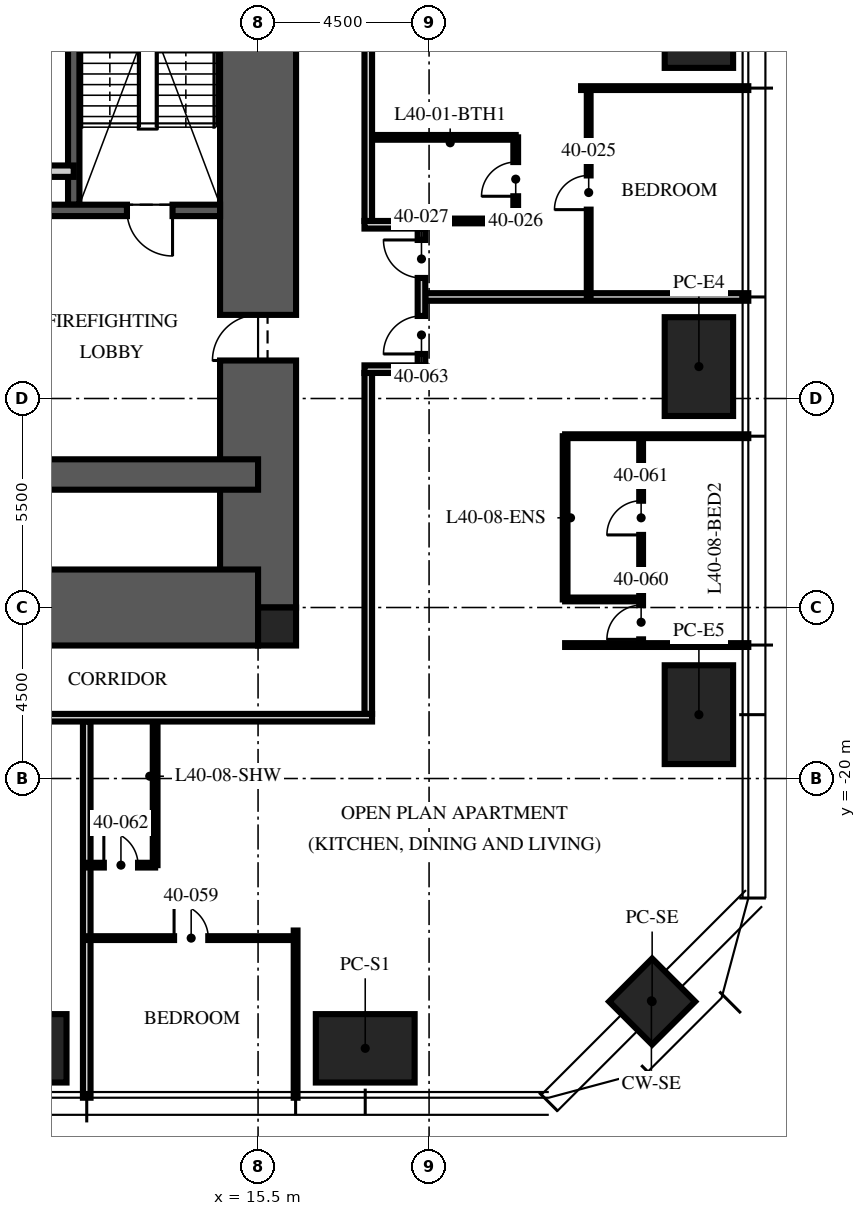
"""IFC4 building model, lengths in metres.
Left out: names, types, materials, properties, quantities, classifications, styles, units other than length and angle.
Written with IfcOpenShell. Run it as: python <this file> out.ifc"""

import sys

from ifc_helpers import new_model, si_unit, direction, frame, frame_2d, origin, origin_2d, place, context, subcontext, project, spatial, rectangle, extrude, element, fill, save


model = new_model("IFC4")
c1 = context("Model", 3, precision=1e-05, world=origin(), true_north=direction((0.0, 1.0)))
c2 = subcontext(c1, "Body", "Model", "MODEL_VIEW")
j1 = project(units=[si_unit("LENGTHUNIT", "METRE"), si_unit("PLANEANGLEUNIT", "RADIAN")], contexts=[c1])
p1 = place(None, origin())
s1 = spatial("IfcSite", under=j1, at=p1, CompositionType="ELEMENT")
p2 = place(p1, origin())
s2 = spatial("IfcBuilding", under=s1, at=p2, CompositionType="ELEMENT")
p3 = place(p2, frame((0.0, 0.0, 159.75)))
s3 = spatial("IfcBuildingStorey", under=s2, at=p3, CompositionType="ELEMENT", Elevation=159.75)
p4 = place(p3, frame((15.5, -15.5, -0.25), z_axis=(0.0, 0.0, 1.0), x_axis=(0.0, 1.0, 0.0)))
e1 = element("IfcWall", 1, at=p4, inside=s3, PredefinedType="SHEAR", context=c2, shape_type="SweptSolid", body=[
    extrude(rectangle(XDim=31.0, YDim=2.0, at=frame_2d((15.5, 0.0))), origin(), (0.0, 0.0, 1.0), 3.75),
])
p5 = place(p4, frame((6.5, 0.0, 0.25)))
e2 = element("IfcOpeningElement", 2, at=p5, cuts=e1, PredefinedType="OPENING", context=c2, shape_type="SweptSolid", body=[
    extrude(rectangle(XDim=1.2, YDim=2.1, at=frame_2d((0.6, 1.05))), frame((0.0, 1.01, 0.0), z_axis=(0.0, -1.0, 0.0), x_axis=(1.0, 0.0, 0.0)), (0.0, 0.0, 1.0), 2.02),
])
p6 = place(p4, frame((23.0, 0.0, 0.25)))
e3 = element("IfcOpeningElement", 3, at=p6, cuts=e1, PredefinedType="OPENING", context=c2, shape_type="SweptSolid", body=[
    extrude(rectangle(XDim=1.8, YDim=2.1, at=frame_2d((0.9, 1.05))), frame((0.0, 1.01, 0.0), z_axis=(0.0, -1.0, 0.0), x_axis=(1.0, 0.0, 0.0)), (0.0, 0.0, 1.0), 2.02),
])
p7 = place(p3, frame((-15.5, -15.5, -0.25), z_axis=(0.0, 0.0, 1.0), x_axis=(1.0, 0.0, 0.0)))
e4 = element("IfcWall", 4, at=p7, inside=s3, PredefinedType="SHEAR", context=c2, shape_type="SweptSolid", body=[
    extrude(rectangle(XDim=31.0, YDim=2.0, at=frame_2d((15.5, 0.0))), origin(), (0.0, 0.0, 1.0), 3.75),
])
p8 = place(p7, frame((10.4, 0.0, 0.25)))
e5 = element("IfcOpeningElement", 5, at=p8, cuts=e4, PredefinedType="OPENING", context=c2, shape_type="SweptSolid", body=[
    extrude(rectangle(XDim=1.1, YDim=2.1, at=frame_2d((0.55, 1.05))), frame((0.0, 1.01, 0.0), z_axis=(0.0, -1.0, 0.0), x_axis=(1.0, 0.0, 0.0)), (0.0, 0.0, 1.0), 2.02),
])
p9 = place(p7, frame((13.5, 0.0, 0.25)))
e6 = element("IfcOpeningElement", 6, at=p9, cuts=e4, PredefinedType="OPENING", context=c2, shape_type="SweptSolid", body=[
    extrude(rectangle(XDim=1.1, YDim=2.1, at=frame_2d((0.55, 1.05))), frame((0.0, 1.01, 0.0), z_axis=(0.0, -1.0, 0.0), x_axis=(1.0, 0.0, 0.0)), (0.0, 0.0, 1.0), 2.02),
])
p10 = place(p7, frame((16.6, 0.0, 0.25)))
e7 = element("IfcOpeningElement", 7, at=p10, cuts=e4, PredefinedType="OPENING", context=c2, shape_type="SweptSolid", body=[
    extrude(rectangle(XDim=1.1, YDim=2.1, at=frame_2d((0.55, 1.05))), frame((0.0, 1.01, 0.0), z_axis=(0.0, -1.0, 0.0), x_axis=(1.0, 0.0, 0.0)), (0.0, 0.0, 1.0), 2.02),
])
p11 = place(p3, frame((-15.5, -12.0, -0.25), z_axis=(0.0, 0.0, 1.0), x_axis=(1.0, 0.0, 0.0)))
e8 = element("IfcWall", 8, at=p11, inside=s3, PredefinedType="SHEAR", context=c2, shape_type="SweptSolid", body=[
    extrude(rectangle(XDim=31.0, YDim=0.8, at=frame_2d((15.5, 0.0))), origin(), (0.0, 0.0, 1.0), 3.75),
])
p12 = place(p3, frame((16.0, -16.0, -0.25), z_axis=(0.0, 0.0, 1.0), x_axis=(1.0, 0.0, 0.0)))
e9 = element("IfcColumn", 9, at=p12, inside=s3, PredefinedType="COLUMN", context=c2, shape_type="SweptSolid", body=[
    extrude(rectangle(XDim=1.0, YDim=1.0, at=origin_2d()), origin(), (0.0, 0.0, 1.0), 3.75),
])
for number, where, z_axis, x_axis in (
    (10, (27.1, 0.0, 0.0), (0.0, 0.0, 1.0), (0.0, 1.0, 0.0)),
    (11, (27.1, -9.16, 0.0), (0.0, 0.0, 1.0), (0.0, 1.0, 0.0)),
    (12, (27.1, -18.32, 0.0), (0.0, 0.0, 1.0), (0.0, 1.0, 0.0)),
    (13, (18.32, -27.1, 0.0), (0.0, 0.0, 1.0), (1.0, 0.0, 0.0)),
    (14, (9.16, -27.1, 0.0), (0.0, 0.0, 1.0), (1.0, 0.0, 0.0)),
):
    element("IfcColumn", number, at=place(p3, frame(where, z_axis=z_axis, x_axis=x_axis)), inside=s3, PredefinedType="COLUMN", context=c2, shape_type="SweptSolid", body=[
        extrude(rectangle(XDim=2.6, YDim=1.8, at=origin_2d()), origin(), (0.0, 0.0, 1.0), 3.75),
    ])
p13 = place(p3, frame((25.87, -25.87, 0.0), z_axis=(0.0, 0.0, 1.0), x_axis=(0.707106781187, 0.707106781187, 0.0)))
e15 = element("IfcColumn", 15, at=p13, inside=s3, PredefinedType="COLUMN", context=c2, shape_type="SweptSolid", body=[
    extrude(rectangle(XDim=1.6, YDim=1.6, at=origin_2d()), origin(), (0.0, 0.0, 1.0), 3.75),
])
p14 = place(p3, frame((10.65, -4.9, 0.0), z_axis=(0.0, 0.0, 1.0), x_axis=(0.0, 1.0, 0.0)))
e16 = element("IfcWall", 16, at=p14, inside=s3, PredefinedType="SOLIDWALL", context=c2, shape_type="SweptSolid", body=[
    extrude(rectangle(XDim=10.1, YDim=0.3, at=frame_2d((5.05, 0.0))), origin(), (0.0, 0.0, 1.0), 3.5),
])
p15 = place(p3, frame((14.5, -5.05, 0.0), z_axis=(0.0, 0.0, 1.0), x_axis=(-1.0, 0.0, 0.0)))
e17 = element("IfcWall", 17, at=p15, inside=s3, PredefinedType="SOLIDWALL", context=c2, shape_type="SweptSolid", body=[
    extrude(rectangle(XDim=5.7, YDim=0.3, at=frame_2d((2.85, 0.0))), origin(), (0.0, 0.0, 1.0), 3.5),
])
p16 = place(p15, frame((1.25, 0.0, 0.0)))
e18 = element("IfcOpeningElement", 18, at=p16, cuts=e17, PredefinedType="OPENING", context=c2, shape_type="SweptSolid", body=[
    extrude(rectangle(XDim=1.2, YDim=2.1, at=frame_2d((0.6, 1.05))), frame((0.0, 0.16, 0.0), z_axis=(0.0, -1.0, 0.0), x_axis=(1.0, 0.0, 0.0)), (0.0, 0.0, 1.0), 0.32),
])
p17 = place(p3, frame((10.65, -4.018, 0.0), z_axis=(0.0, 0.0, 1.0), x_axis=(-1.0, 0.0, 0.0)))
e19 = element("IfcWall", 19, at=p17, inside=s3, PredefinedType="PARTITIONING", context=c2, shape_type="SweptSolid", body=[
    extrude(rectangle(XDim=6.45, YDim=0.3, at=frame_2d((3.225, 0.0))), origin(), (0.0, 0.0, 1.0), 3.5),
])
p18 = place(p3, frame((19.9, -7.328, 0.0), z_axis=(0.0, 0.0, 1.0), x_axis=(1.0, 0.0, 0.0)))
e20 = element("IfcWall", 20, at=p18, inside=s3, PredefinedType="PARTITIONING", context=c2, shape_type="SweptSolid", body=[
    extrude(rectangle(XDim=8.5, YDim=0.2, at=frame_2d((4.25, 0.0))), origin(), (0.0, 0.0, 1.0), 2.81),
])
p19 = place(p3, frame((24.0, -1.832, 0.0), z_axis=(0.0, 0.0, 1.0), x_axis=(1.0, 0.0, 0.0)))
e21 = element("IfcWall", 21, at=p19, inside=s3, PredefinedType="PARTITIONING", context=c2, shape_type="SweptSolid", body=[
    extrude(rectangle(XDim=4.4, YDim=0.1, at=frame_2d((2.2, 0.0))), origin(), (0.0, 0.0, 1.0), 2.81),
])
p20 = place(p3, frame((10.992, -18.5, 0.0), z_axis=(0.0, 0.0, 1.0), x_axis=(0.0, -1.0, 0.0)))
e22 = element("IfcWall", 22, at=p20, inside=s3, PredefinedType="PARTITIONING", context=c2, shape_type="SweptSolid", body=[
    extrude(rectangle(XDim=9.9, YDim=0.2, at=frame_2d((4.95, 0.0))), origin(), (0.0, 0.0, 1.0), 2.81),
])
p21 = place(p3, frame((16.488, -24.0, 0.0), z_axis=(0.0, 0.0, 1.0), x_axis=(0.0, -1.0, 0.0)))
e23 = element("IfcWall", 23, at=p21, inside=s3, PredefinedType="PARTITIONING", context=c2, shape_type="SweptSolid", body=[
    extrude(rectangle(XDim=4.4, YDim=0.1, at=frame_2d((2.2, 0.0))), origin(), (0.0, 0.0, 1.0), 2.81),
])
for number, where, z_axis, x_axis in (
    (24, (23.58, -16.488, 0.0), (0.0, 0.0, 1.0), (1.0, 0.0, 0.0)),
    (25, (23.58, -10.992, 0.0), (0.0, 0.0, 1.0), (1.0, 0.0, 0.0)),
):
    element("IfcWall", number, at=place(p3, frame(where, z_axis=z_axis, x_axis=x_axis)), inside=s3, PredefinedType="PARTITIONING", context=c2, shape_type="SweptSolid", body=[
        extrude(rectangle(XDim=4.82, YDim=0.1, at=frame_2d((2.41, 0.0))), origin(), (0.0, 0.0, 1.0), 2.81),
    ])
p22 = place(p3, frame((24.2, -7.328, 0.0), z_axis=(0.0, 0.0, 1.0), x_axis=(0.0, 1.0, 0.0)))
e26 = element("IfcWall", 26, at=p22, inside=s3, PredefinedType="PARTITIONING", context=c2, shape_type="SweptSolid", body=[
    extrude(rectangle(XDim=5.496, YDim=0.1, at=frame_2d((2.748, 0.0))), origin(), (0.0, 0.0, 1.0), 2.81),
])
p23 = place(p22, frame((2.298, 0.0, 0.0)))
e27 = element("IfcOpeningElement", 27, at=p23, cuts=e26, PredefinedType="OPENING", context=c2, shape_type="SweptSolid", body=[
    extrude(rectangle(XDim=0.9, YDim=2.1, at=frame_2d((0.45, 1.05))), frame((0.0, 0.06, 0.0), z_axis=(0.0, -1.0, 0.0), x_axis=(1.0, 0.0, 0.0)), (0.0, 0.0, 1.0), 0.12),
])
p24 = place(p3, frame((22.28, -5.328, 0.0), z_axis=(0.0, 0.0, 1.0), x_axis=(0.0, 1.0, 0.0)))
e28 = element("IfcWall", 28, at=p24, inside=s3, PredefinedType="PARTITIONING", context=c2, shape_type="SweptSolid", body=[
    extrude(rectangle(XDim=2.2, YDim=0.125, at=frame_2d((1.1, 0.0))), origin(), (0.0, 0.0, 1.0), 2.81),
])
p25 = place(p24, frame((0.65, 0.0, 0.0)))
e29 = element("IfcOpeningElement", 29, at=p25, cuts=e28, PredefinedType="OPENING", context=c2, shape_type="SweptSolid", body=[
    extrude(rectangle(XDim=0.9, YDim=2.1, at=frame_2d((0.45, 1.05))), frame((0.0, 0.073, 0.0), z_axis=(0.0, -1.0, 0.0), x_axis=(1.0, 0.0, 0.0)), (0.0, 0.0, 1.0), 0.145),
])
p26 = place(p3, frame((19.97, -5.328, 0.0), z_axis=(0.0, 0.0, 1.0), x_axis=(1.0, 0.0, 0.0)))
e30 = element("IfcWall", 30, at=p26, inside=s3, PredefinedType="PARTITIONING", context=c2, shape_type="SweptSolid", body=[
    extrude(rectangle(XDim=2.31, YDim=0.125, at=frame_2d((1.155, 0.0))), origin(), (0.0, 0.0, 1.0), 3.5),
])
p27 = place(p3, frame((18.5, -3.128, 0.0), z_axis=(0.0, 0.0, 1.0), x_axis=(1.0, 0.0, 0.0)))
e31 = element("IfcWall", 31, at=p27, inside=s3, PredefinedType="PARTITIONING", context=c2, shape_type="SweptSolid", body=[
    extrude(rectangle(XDim=3.78, YDim=0.125, at=frame_2d((1.89, 0.0))), origin(), (0.0, 0.0, 1.0), 3.5),
])
p28 = place(p3, frame((10.992, -24.2, 0.0), z_axis=(0.0, 0.0, 1.0), x_axis=(1.0, 0.0, 0.0)))
e32 = element("IfcWall", 32, at=p28, inside=s3, PredefinedType="PARTITIONING", context=c2, shape_type="SweptSolid", body=[
    extrude(rectangle(XDim=5.496, YDim=0.1, at=frame_2d((2.748, 0.0))), origin(), (0.0, 0.0, 1.0), 2.81),
])
p29 = place(p28, frame((2.298, 0.0, 0.0)))
e33 = element("IfcOpeningElement", 33, at=p29, cuts=e32, PredefinedType="OPENING", context=c2, shape_type="SweptSolid", body=[
    extrude(rectangle(XDim=0.9, YDim=2.1, at=frame_2d((0.45, 1.05))), frame((0.0, 0.06, 0.0), z_axis=(0.0, -1.0, 0.0), x_axis=(1.0, 0.0, 0.0)), (0.0, 0.0, 1.0), 0.12),
])
p30 = place(p3, frame((25.58, -16.488, 0.0), z_axis=(0.0, 0.0, 1.0), x_axis=(0.0, 1.0, 0.0)))
e34 = element("IfcWall", 34, at=p30, inside=s3, PredefinedType="PARTITIONING", context=c2, shape_type="SweptSolid", body=[
    extrude(rectangle(XDim=5.496, YDim=0.1, at=frame_2d((2.748, 0.0))), origin(), (0.0, 0.0, 1.0), 2.81),
])
p31 = place(p30, frame((0.15, 0.0, 0.0)))
e35 = element("IfcOpeningElement", 35, at=p31, cuts=e34, PredefinedType="OPENING", context=c2, shape_type="SweptSolid", body=[
    extrude(rectangle(XDim=0.9, YDim=2.1, at=frame_2d((0.45, 1.05))), frame((0.0, 0.06, 0.0), z_axis=(0.0, -1.0, 0.0), x_axis=(1.0, 0.0, 0.0)), (0.0, 0.0, 1.0), 0.12),
])
p32 = place(p30, frame((2.898, 0.0, 0.0)))
e36 = element("IfcOpeningElement", 36, at=p32, cuts=e34, PredefinedType="OPENING", context=c2, shape_type="SweptSolid", body=[
    extrude(rectangle(XDim=0.9, YDim=2.1, at=frame_2d((0.45, 1.05))), frame((0.0, 0.06, 0.0), z_axis=(0.0, -1.0, 0.0), x_axis=(1.0, 0.0, 0.0)), (0.0, 0.0, 1.0), 0.12),
])
p33 = place(p3, frame((23.58, -15.288, 0.0), z_axis=(0.0, 0.0, 1.0), x_axis=(1.0, 0.0, 0.0)))
e37 = element("IfcWall", 37, at=p33, inside=s3, PredefinedType="PARTITIONING", context=c2, shape_type="SweptSolid", body=[
    extrude(rectangle(XDim=2.0, YDim=0.1, at=frame_2d((1.0, 0.0))), origin(), (0.0, 0.0, 1.0), 3.5),
])
p34 = place(p3, frame((23.58, -15.288, 0.0), z_axis=(0.0, 0.0, 1.0), x_axis=(0.0, 1.0, 0.0)))
e38 = element("IfcWall", 38, at=p34, inside=s3, PredefinedType="PARTITIONING", context=c2, shape_type="SweptSolid", body=[
    extrude(rectangle(XDim=4.296, YDim=0.125, at=frame_2d((2.148, 0.0))), origin(), (0.0, 0.0, 1.0), 2.81),
])
p35 = place(p3, frame((10.992, -22.28, 0.0), z_axis=(0.0, 0.0, 1.0), x_axis=(1.0, 0.0, 0.0)))
e39 = element("IfcWall", 39, at=p35, inside=s3, PredefinedType="PARTITIONING", context=c2, shape_type="SweptSolid", body=[
    extrude(rectangle(XDim=1.8, YDim=0.125, at=frame_2d((0.9, 0.0))), origin(), (0.0, 0.0, 1.0), 3.5),
])
p36 = place(p35, frame((0.45, 0.0, 0.0)))
e40 = element("IfcOpeningElement", 40, at=p36, cuts=e39, PredefinedType="OPENING", context=c2, shape_type="SweptSolid", body=[
    extrude(rectangle(XDim=0.9, YDim=2.1, at=frame_2d((0.45, 1.05))), frame((0.0, 0.073, 0.0), z_axis=(0.0, -1.0, 0.0), x_axis=(1.0, 0.0, 0.0)), (0.0, 0.0, 1.0), 0.145),
])
p37 = place(p3, frame((12.792, -18.5, 0.0), z_axis=(0.0, 0.0, 1.0), x_axis=(0.0, -1.0, 0.0)))
e41 = element("IfcWall", 41, at=p37, inside=s3, PredefinedType="PARTITIONING", context=c2, shape_type="SweptSolid", body=[
    extrude(rectangle(XDim=3.78, YDim=0.125, at=frame_2d((1.89, 0.0))), origin(), (0.0, 0.0, 1.0), 3.5),
])
p38 = place(p3, frame((18.4, -18.3, 0.0), z_axis=(0.0, 0.0, 1.0), x_axis=(0.0, 1.0, 0.0)))
e42 = element("IfcWall", 42, at=p38, inside=s3, PredefinedType="PARTITIONING", context=c2, shape_type="SweptSolid", body=[
    extrude(rectangle(XDim=8.972, YDim=0.2, at=frame_2d((4.486, 0.0))), origin(), (0.0, 0.0, 1.0), 2.3),
])
p39 = place(p3, frame((18.3, -9.228, 0.0), z_axis=(0.0, 0.0, 1.0), x_axis=(1.0, 0.0, 0.0)))
e43 = element("IfcWall", 43, at=p39, inside=s3, PredefinedType="PARTITIONING", context=c2, shape_type="SweptSolid", body=[
    extrude(rectangle(XDim=1.6, YDim=0.2, at=frame_2d((0.8, 0.0))), origin(), (0.0, 0.0, 1.0), 2.7),
])
p40 = place(p3, frame((18.3, -5.428, 0.0), z_axis=(0.0, 0.0, 1.0), x_axis=(1.0, 0.0, 0.0)))
e44 = element("IfcWall", 44, at=p40, inside=s3, PredefinedType="PARTITIONING", context=c2, shape_type="SweptSolid", body=[
    extrude(rectangle(XDim=1.6, YDim=0.2, at=frame_2d((0.8, 0.0))), origin(), (0.0, 0.0, 1.0), 3.5),
])
p41 = place(p3, frame((19.8, -9.128, 0.0), z_axis=(0.0, 0.0, 1.0), x_axis=(0.0, 1.0, 0.0)))
e45 = element("IfcWall", 45, at=p41, inside=s3, PredefinedType="PARTITIONING", context=c2, shape_type="SweptSolid", body=[
    extrude(rectangle(XDim=3.6, YDim=0.2, at=frame_2d((1.8, 0.0))), origin(), (0.0, 0.0, 1.0), 2.7),
])
p42 = place(p41, frame((2.3, 0.0, 0.0)))
e46 = element("IfcOpeningElement", 46, at=p42, cuts=e45, PredefinedType="OPENING", context=c2, shape_type="SweptSolid", body=[
    extrude(rectangle(XDim=1.0, YDim=2.2, at=frame_2d((0.5, 1.1))), frame((0.0, 0.11, 0.0), z_axis=(0.0, -1.0, 0.0), x_axis=(1.0, 0.0, 0.0)), (0.0, 0.0, 1.0), 0.22),
])
p43 = place(p41, frame((0.3, 0.0, 0.0)))
e47 = element("IfcOpeningElement", 47, at=p43, cuts=e45, PredefinedType="OPENING", context=c2, shape_type="SweptSolid", body=[
    extrude(rectangle(XDim=1.0, YDim=2.2, at=frame_2d((0.5, 1.1))), frame((0.0, 0.11, 0.0), z_axis=(0.0, -1.0, 0.0), x_axis=(1.0, 0.0, 0.0)), (0.0, 0.0, 1.0), 0.22),
])
p44 = place(p3, frame((18.4, -5.328, 0.0), z_axis=(0.0, 0.0, 1.0), x_axis=(0.0, 1.0, 0.0)))
e48 = element("IfcWall", 48, at=p44, inside=s3, PredefinedType="PARTITIONING", context=c2, shape_type="SweptSolid", body=[
    extrude(rectangle(XDim=22.028, YDim=0.2, at=frame_2d((11.014, 0.0))), origin(), (0.0, 0.0, 1.0), 2.7),
])
p45 = place(p44, frame((19.68, 0.0, 0.0)))
e49 = element("IfcOpeningElement", 49, at=p45, cuts=e48, PredefinedType="OPENING", context=c2, shape_type="SweptSolid", body=[
    extrude(rectangle(XDim=1.0, YDim=2.2, at=frame_2d((0.5, 1.1))), frame((0.0, 0.11, 0.0), z_axis=(0.0, -1.0, 0.0), x_axis=(1.0, 0.0, 0.0)), (0.0, 0.0, 1.0), 0.22),
])
p46 = place(p3, frame((18.5, -18.4, 0.0), z_axis=(0.0, 0.0, 1.0), x_axis=(-1.0, 0.0, 0.0)))
e50 = element("IfcWall", 50, at=p46, inside=s3, PredefinedType="PARTITIONING", context=c2, shape_type="SweptSolid", body=[
    extrude(rectangle(XDim=12.9, YDim=0.2, at=frame_2d((6.45, 0.0))), origin(), (0.0, 0.0, 1.0), 2.3),
])
p47 = place(p16, origin())
e51 = element("IfcDoor", 51, at=p47, inside=s3, OperationType="SINGLE_SWING_LEFT", PredefinedType="DOOR", context=c2, shape_type="SweptSolid", body=[
    extrude(rectangle(XDim=1.2, YDim=2.1, at=frame_2d((0.6, 1.05))), frame((0.0, 0.025, 0.0), z_axis=(0.0, -1.0, 0.0), x_axis=(1.0, 0.0, 0.0)), (0.0, 0.0, 1.0), 0.05),
])
fill(e18, e51)
p48 = place(p5, origin())
e52 = element("IfcDoor", 52, at=p48, inside=s3, OperationType="SINGLE_SWING_LEFT", PredefinedType="DOOR", context=c2, shape_type="SweptSolid", body=[
    extrude(rectangle(XDim=1.2, YDim=2.1, at=frame_2d((0.6, 1.05))), frame((0.0, 0.025, 0.0), z_axis=(0.0, -1.0, 0.0), x_axis=(1.0, 0.0, 0.0)), (0.0, 0.0, 1.0), 0.05),
])
fill(e2, e52)
p49 = place(p23, origin())
e53 = element("IfcDoor", 53, at=p49, inside=s3, OperationType="SINGLE_SWING_LEFT", PredefinedType="DOOR", context=c2, shape_type="SweptSolid", body=[
    extrude(rectangle(XDim=0.9, YDim=2.1, at=frame_2d((0.45, 1.05))), frame((0.0, 0.025, 0.0), z_axis=(0.0, -1.0, 0.0), x_axis=(1.0, 0.0, 0.0)), (0.0, 0.0, 1.0), 0.05),
])
fill(e27, e53)
p50 = place(p25, origin())
e54 = element("IfcDoor", 54, at=p50, inside=s3, OperationType="SINGLE_SWING_LEFT", PredefinedType="DOOR", context=c2, shape_type="SweptSolid", body=[
    extrude(rectangle(XDim=0.9, YDim=2.1, at=frame_2d((0.45, 1.05))), frame((0.0, 0.025, 0.0), z_axis=(0.0, -1.0, 0.0), x_axis=(1.0, 0.0, 0.0)), (0.0, 0.0, 1.0), 0.05),
])
fill(e29, e54)
p51 = place(p42, origin())
e55 = element("IfcDoor", 55, at=p51, inside=s3, OperationType="SINGLE_SWING_RIGHT", PredefinedType="DOOR", context=c2, shape_type="SweptSolid", body=[
    extrude(rectangle(XDim=1.0, YDim=2.2, at=frame_2d((0.5, 1.1))), frame((0.0, 0.025, 0.0), z_axis=(0.0, -1.0, 0.0), x_axis=(1.0, 0.0, 0.0)), (0.0, 0.0, 1.0), 0.05),
])
fill(e46, e55)
p52 = place(p29, origin())
e56 = element("IfcDoor", 56, at=p52, inside=s3, OperationType="SINGLE_SWING_LEFT", PredefinedType="DOOR", context=c2, shape_type="SweptSolid", body=[
    extrude(rectangle(XDim=0.9, YDim=2.1, at=frame_2d((0.45, 1.05))), frame((0.0, 0.025, 0.0), z_axis=(0.0, -1.0, 0.0), x_axis=(1.0, 0.0, 0.0)), (0.0, 0.0, 1.0), 0.05),
])
fill(e33, e56)
p53 = place(p31, origin())
e57 = element("IfcDoor", 57, at=p53, inside=s3, OperationType="SINGLE_SWING_LEFT", PredefinedType="DOOR", context=c2, shape_type="SweptSolid", body=[
    extrude(rectangle(XDim=0.9, YDim=2.1, at=frame_2d((0.45, 1.05))), frame((0.0, 0.025, 0.0), z_axis=(0.0, -1.0, 0.0), x_axis=(1.0, 0.0, 0.0)), (0.0, 0.0, 1.0), 0.05),
])
fill(e35, e57)
p54 = place(p32, origin())
e58 = element("IfcDoor", 58, at=p54, inside=s3, OperationType="SINGLE_SWING_LEFT", PredefinedType="DOOR", context=c2, shape_type="SweptSolid", body=[
    extrude(rectangle(XDim=0.9, YDim=2.1, at=frame_2d((0.45, 1.05))), frame((0.0, 0.025, 0.0), z_axis=(0.0, -1.0, 0.0), x_axis=(1.0, 0.0, 0.0)), (0.0, 0.0, 1.0), 0.05),
])
fill(e36, e58)
p55 = place(p36, origin())
e59 = element("IfcDoor", 59, at=p55, inside=s3, OperationType="SINGLE_SWING_LEFT", PredefinedType="DOOR", context=c2, shape_type="SweptSolid", body=[
    extrude(rectangle(XDim=0.9, YDim=2.1, at=frame_2d((0.45, 1.05))), frame((0.0, 0.025, 0.0), z_axis=(0.0, -1.0, 0.0), x_axis=(1.0, 0.0, 0.0)), (0.0, 0.0, 1.0), 0.05),
])
fill(e40, e59)
p56 = place(p43, origin())
e60 = element("IfcDoor", 60, at=p56, inside=s3, OperationType="SINGLE_SWING_LEFT", PredefinedType="DOOR", context=c2, shape_type="SweptSolid", body=[
    extrude(rectangle(XDim=1.0, YDim=2.2, at=frame_2d((0.5, 1.1))), frame((0.0, 0.025, 0.0), z_axis=(0.0, -1.0, 0.0), x_axis=(1.0, 0.0, 0.0)), (0.0, 0.0, 1.0), 0.05),
])
fill(e47, e60)
save(model, sys.argv[1])
